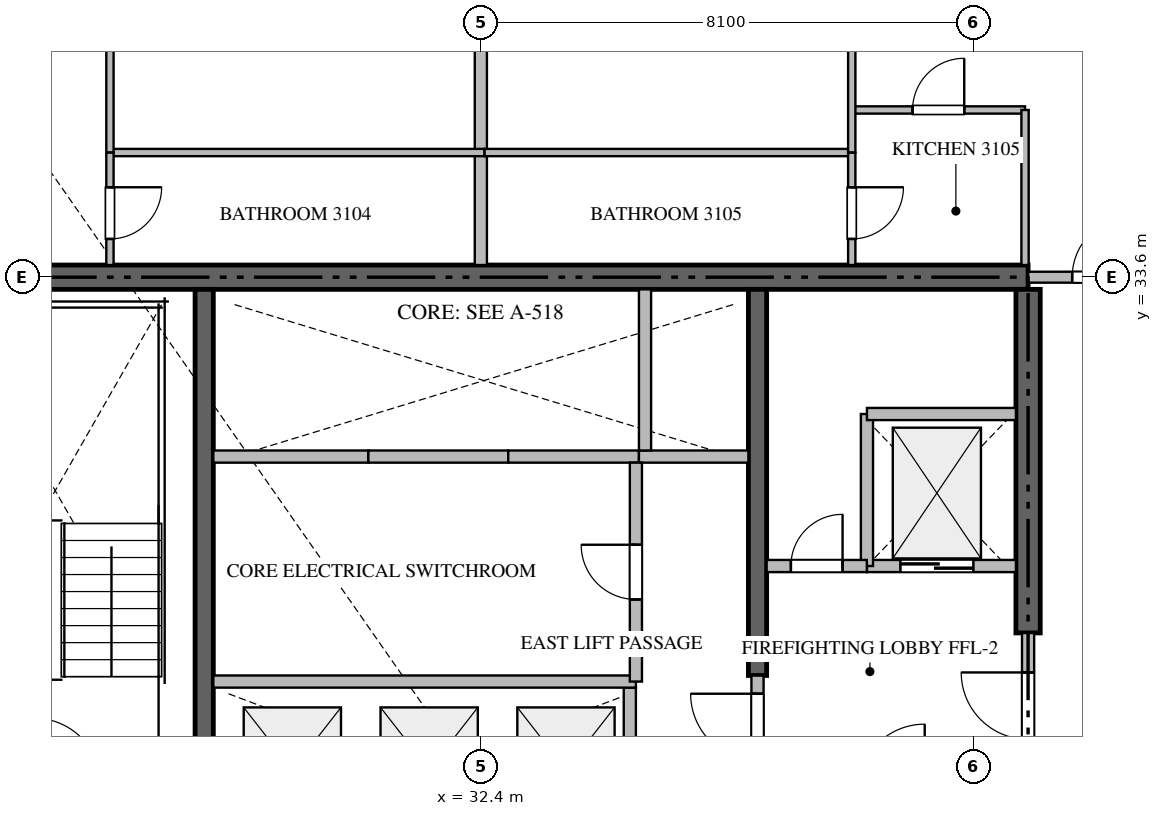
"""IFC4 building model, lengths in metres.
Left out: names, types, materials, properties, quantities, classifications, styles, units other than length and angle.
Written with IfcOpenShell. Run it as: python <this file> out.ifc"""

import sys

from ifc_helpers import new_model, si_unit, direction, frame, frame_2d, origin, place, context, subcontext, project, spatial, rectangle, extrude, source, transform, mapped, element, fill, save


model = new_model("IFC4")
c1 = context("Model", 3, precision=1e-05, world=origin(), true_north=direction((0.0, 1.0)))
c2 = subcontext(c1, "Body", "Model", "MODEL_VIEW")
j1 = project(units=[si_unit("LENGTHUNIT", "METRE"), si_unit("PLANEANGLEUNIT", "RADIAN")], contexts=[c1])
p1 = place(None, origin())
s1 = spatial("IfcSite", under=j1, at=p1, CompositionType="ELEMENT")
p2 = place(p1, origin())
s2 = spatial("IfcBuilding", under=s1, at=p2, CompositionType="ELEMENT")
p3 = place(p2, frame((0.0, 0.0, 127.65)))
s3 = spatial("IfcBuildingStorey", under=s2, at=p3, CompositionType="ELEMENT", Elevation=127.65)
p4 = place(p3, frame((41.4, 33.6, -0.26), z_axis=(0.0, 0.0, 1.0), x_axis=(-1.0, 0.0, 0.0)))
e1 = element("IfcWall", 1, at=p4, inside=s3, PredefinedType="SHEAR", context=c2, shape_type="SweptSolid", body=[
    extrude(rectangle(XDim=18.0, YDim=0.4, at=frame_2d((9.0, 0.0))), origin(), (0.0, 0.0, 1.0), 3.748),
])
p5 = place(p3, frame((41.4, 27.75, -0.26), z_axis=(0.0, 0.0, 1.0), x_axis=(0.0, 1.0, 0.0)))
e2 = element("IfcWall", 2, at=p5, inside=s3, PredefinedType="SHEAR", context=c2, shape_type="SweptSolid", body=[
    extrude(rectangle(XDim=5.65, YDim=0.4, at=frame_2d((2.825, 0.0))), origin(), (0.0, 0.0, 1.0), 3.748),
])
p6 = place(p3, frame((27.85, 23.55, -0.26), z_axis=(0.0, 0.0, 1.0), x_axis=(0.0, 1.0, 0.0)))
e3 = element("IfcWall", 3, at=p6, inside=s3, PredefinedType="SHEAR", context=c2, shape_type="SweptSolid", body=[
    extrude(rectangle(XDim=9.85, YDim=0.3, at=frame_2d((4.925, 0.0))), origin(), (0.0, 0.0, 1.0), 3.748),
])
p7 = place(p3, frame((36.95, 27.05, -0.26), z_axis=(0.0, 0.0, 1.0), x_axis=(0.0, 1.0, 0.0)))
e4 = element("IfcWall", 4, at=p7, inside=s3, PredefinedType="SHEAR", context=c2, shape_type="SweptSolid", body=[
    extrude(rectangle(XDim=6.35, YDim=0.3, at=frame_2d((3.175, 0.0))), origin(), (0.0, 0.0, 1.0), 3.748),
])
p8 = place(p3, frame((38.75, 28.85, 0.0), z_axis=(0.0, 0.0, 1.0), x_axis=(1.0, 0.0, 0.0)))
e5 = element("IfcWall", 5, at=p8, inside=s3, PredefinedType="STANDARD", context=c2, shape_type="SweptSolid", body=[
    extrude(rectangle(XDim=2.45, YDim=0.2, at=frame_2d((1.225, 0.0))), origin(), (0.0, 0.0, 1.0), 3.49),
])
p9 = place(p8, frame((0.55, 0.0, 0.0)))
e6 = element("IfcOpeningElement", 6, at=p9, cuts=e5, PredefinedType="OPENING", context=c2, shape_type="SweptSolid", body=[
    extrude(rectangle(XDim=1.2, YDim=2.2, at=frame_2d((0.6, 1.1))), frame((0.0, 0.11, 0.0), z_axis=(0.0, -1.0, 0.0), x_axis=(1.0, 0.0, 0.0)), (0.0, 0.0, 1.0), 0.22),
])
p10 = place(p3, frame((34.85, 24.35, 0.0), z_axis=(0.0, 0.0, 1.0), x_axis=(0.0, 1.0, 0.0)))
e7 = element("IfcWall", 7, at=p10, inside=s3, PredefinedType="STANDARD", context=c2, shape_type="SweptSolid", body=[
    extrude(rectangle(XDim=2.5, YDim=0.2, at=frame_2d((1.25, 0.0))), origin(), (0.0, 0.0, 1.0), 3.49),
])
p11 = place(p3, frame((28.0, 30.65, 0.0), z_axis=(0.0, 0.0, 1.0), x_axis=(1.0, 0.0, 0.0)))
e8 = element("IfcWall", 8, at=p11, inside=s3, PredefinedType="STANDARD", context=c2, shape_type="SweptSolid", body=[
    extrude(rectangle(XDim=2.55, YDim=0.2, at=frame_2d((1.275, 0.0))), origin(), (0.0, 0.0, 1.0), 3.49),
])
p12 = place(p3, frame((30.55, 30.65, 0.0), z_axis=(0.0, 0.0, 1.0), x_axis=(1.0, 0.0, 0.0)))
e9 = element("IfcWall", 9, at=p12, inside=s3, PredefinedType="STANDARD", context=c2, shape_type="SweptSolid", body=[
    extrude(rectangle(XDim=2.3, YDim=0.2, at=frame_2d((1.15, 0.0))), origin(), (0.0, 0.0, 1.0), 3.49),
])
p13 = place(p3, frame((32.85, 30.65, 0.0), z_axis=(0.0, 0.0, 1.0), x_axis=(1.0, 0.0, 0.0)))
e10 = element("IfcWall", 10, at=p13, inside=s3, PredefinedType="STANDARD", context=c2, shape_type="SweptSolid", body=[
    extrude(rectangle(XDim=2.15, YDim=0.2, at=frame_2d((1.075, 0.0))), origin(), (0.0, 0.0, 1.0), 3.49),
])
p14 = place(p3, frame((35.0, 30.65, 0.0), z_axis=(0.0, 0.0, 1.0), x_axis=(1.0, 0.0, 0.0)))
e11 = element("IfcWall", 11, at=p14, inside=s3, PredefinedType="STANDARD", context=c2, shape_type="SweptSolid", body=[
    extrude(rectangle(XDim=1.8, YDim=0.2, at=frame_2d((0.9, 0.0))), origin(), (0.0, 0.0, 1.0), 3.49),
])
p15 = place(p3, frame((35.1, 30.75, 0.0), z_axis=(0.0, 0.0, 1.0), x_axis=(0.0, 1.0, 0.0)))
e12 = element("IfcWall", 12, at=p15, inside=s3, PredefinedType="STANDARD", context=c2, shape_type="SweptSolid", body=[
    extrude(rectangle(XDim=2.65, YDim=0.2, at=frame_2d((1.325, 0.0))), origin(), (0.0, 0.0, 1.0), 3.49),
])
p16 = place(p3, frame((38.75, 28.85, 0.0), z_axis=(0.0, 0.0, 1.0), x_axis=(0.0, 1.0, 0.0)))
e13 = element("IfcWall", 13, at=p16, inside=s3, PredefinedType="STANDARD", context=c2, shape_type="SweptSolid", body=[
    extrude(rectangle(XDim=2.5, YDim=0.2, at=frame_2d((1.25, 0.0))), origin(), (0.0, 0.0, 1.0), 3.49),
])
p17 = place(p3, frame((38.75, 31.35, 0.0), z_axis=(0.0, 0.0, 1.0), x_axis=(1.0, 0.0, 0.0)))
e14 = element("IfcWall", 14, at=p17, inside=s3, PredefinedType="STANDARD", context=c2, shape_type="SweptSolid", body=[
    extrude(rectangle(XDim=2.45, YDim=0.2, at=frame_2d((1.225, 0.0))), origin(), (0.0, 0.0, 1.0), 3.49),
])
p18 = place(p3, frame((37.1, 28.85, 0.0), z_axis=(0.0, 0.0, 1.0), x_axis=(1.0, 0.0, 0.0)))
e15 = element("IfcWall", 15, at=p18, inside=s3, PredefinedType="STANDARD", context=c2, shape_type="SweptSolid", body=[
    extrude(rectangle(XDim=1.648, YDim=0.2, at=frame_2d((0.824, 0.0))), origin(), (0.0, 0.0, 1.0), 3.49),
])
p19 = place(p18, frame((0.399, 0.0, 0.0)))
e16 = element("IfcOpeningElement", 16, at=p19, cuts=e15, PredefinedType="OPENING", context=c2, shape_type="SweptSolid", body=[
    extrude(rectangle(XDim=0.85, YDim=2.1, at=frame_2d((0.425, 1.05))), frame((0.0, 0.11, 0.0), z_axis=(0.0, -1.0, 0.0), x_axis=(1.0, 0.0, 0.0)), (0.0, 0.0, 1.0), 0.22),
])
p20 = place(p3, frame((41.4, 25.352, 0.0), z_axis=(0.0, 0.0, 1.0), x_axis=(0.0, 1.0, 0.0)))
e17 = element("IfcWall", 17, at=p20, inside=s3, PredefinedType="STANDARD", context=c2, shape_type="SweptSolid", body=[
    extrude(rectangle(XDim=2.396, YDim=0.2, at=frame_2d((1.198, 0.0))), origin(), (0.0, 0.0, 1.0), 3.49),
])
p21 = place(p20, frame((0.648, 0.0, 0.0)))
e18 = element("IfcOpeningElement", 18, at=p21, cuts=e17, PredefinedType="OPENING", context=c2, shape_type="SweptSolid", body=[
    extrude(rectangle(XDim=1.1, YDim=2.15, at=frame_2d((0.55, 1.075))), frame((0.0, 0.11, 0.0), z_axis=(0.0, -1.0, 0.0), x_axis=(1.0, 0.0, 0.0)), (0.0, 0.0, 1.0), 0.22),
])
p22 = place(p3, frame((36.95, 25.352, 0.0), z_axis=(0.0, 0.0, 1.0), x_axis=(0.0, 1.0, 0.0)))
e19 = element("IfcWall", 19, at=p22, inside=s3, PredefinedType="STANDARD", context=c2, shape_type="SweptSolid", body=[
    extrude(rectangle(XDim=1.696, YDim=0.2, at=frame_2d((0.848, 0.0))), origin(), (0.0, 0.0, 1.0), 3.49),
])
p23 = place(p22, frame((0.298, 0.0, 0.0)))
e20 = element("IfcOpeningElement", 20, at=p23, cuts=e19, PredefinedType="OPENING", context=c2, shape_type="SweptSolid", body=[
    extrude(rectangle(XDim=1.1, YDim=2.15, at=frame_2d((0.55, 1.075))), frame((0.0, 0.11, 0.0), z_axis=(0.0, -1.0, 0.0), x_axis=(1.0, 0.0, 0.0)), (0.0, 0.0, 1.0), 0.22),
])
p24 = place(p3, frame((28.0, 26.95, 0.0), z_axis=(0.0, 0.0, 1.0), x_axis=(1.0, 0.0, 0.0)))
e21 = element("IfcWall", 21, at=p24, inside=s3, PredefinedType="STANDARD", context=c2, shape_type="SweptSolid", body=[
    extrude(rectangle(XDim=6.95, YDim=0.2, at=frame_2d((3.475, 0.0))), origin(), (0.0, 0.0, 1.0), 3.49),
])
p25 = place(p3, frame((34.95, 26.95, 0.0), z_axis=(0.0, 0.0, 1.0), x_axis=(0.0, 1.0, 0.0)))
e22 = element("IfcWall", 22, at=p25, inside=s3, PredefinedType="STANDARD", context=c2, shape_type="SweptSolid", body=[
    extrude(rectangle(XDim=3.6, YDim=0.2, at=frame_2d((1.8, 0.0))), origin(), (0.0, 0.0, 1.0), 3.49),
])
p26 = place(p25, frame((1.35, 0.0, 0.0)))
e23 = element("IfcOpeningElement", 23, at=p26, cuts=e22, PredefinedType="OPENING", context=c2, shape_type="SweptSolid", body=[
    extrude(rectangle(XDim=0.9, YDim=2.1, at=frame_2d((0.45, 1.05))), frame((0.0, 0.11, 0.0), z_axis=(0.0, -1.0, 0.0), x_axis=(1.0, 0.0, 0.0)), (0.0, 0.0, 1.0), 0.22),
])
p27 = place(p3, frame((32.4, 33.8, 0.0), z_axis=(0.0, 0.0, 1.0), x_axis=(0.0, 1.0, 0.0)))
e24 = element("IfcWall", 24, at=p27, inside=s3, PredefinedType="PARTITIONING", context=c2, shape_type="SweptSolid", body=[
    extrude(rectangle(XDim=15.118, YDim=0.2, at=frame_2d((7.559, 0.0))), origin(), (0.0, 0.0, 1.0), 3.49),
])
p28 = place(p3, frame((41.402, 33.6, 0.0), z_axis=(0.0, 0.0, 1.0), x_axis=(1.0, 0.0, 0.0)))
e25 = element("IfcWall", 25, at=p28, inside=s3, PredefinedType="PARTITIONING", context=c2, shape_type="SweptSolid", body=[
    extrude(rectangle(XDim=2.446, YDim=0.18, at=frame_2d((1.223, 0.0))), origin(), (0.0, 0.0, 1.0), 3.49),
])
p29 = place(p28, frame((0.723, 0.0, 0.0)))
e26 = element("IfcOpeningElement", 26, at=p29, cuts=e25, PredefinedType="OPENING", context=c2, shape_type="SweptSolid", body=[
    extrude(rectangle(XDim=1.0, YDim=2.15, at=frame_2d((0.5, 1.075))), frame((0.0, 0.1, 0.0), z_axis=(0.0, -1.0, 0.0), x_axis=(1.0, 0.0, 0.0)), (0.0, 0.0, 1.0), 0.2),
])
p30 = place(p3, frame((26.3, 35.65, 0.0), z_axis=(0.0, 0.0, 1.0), x_axis=(1.0, 0.0, 0.0)))
e27 = element("IfcWall", 27, at=p30, inside=s3, PredefinedType="PARTITIONING", context=c2, shape_type="SweptSolid", body=[
    extrude(rectangle(XDim=6.16, YDim=0.12, at=frame_2d((3.08, 0.0))), origin(), (0.0, 0.0, 1.0), 3.49),
])
p31 = place(p3, frame((26.3, 43.927, 0.0), z_axis=(0.0, 0.0, 1.0), x_axis=(0.0, -1.0, 0.0)))
e28 = element("IfcWall", 28, at=p31, inside=s3, PredefinedType="PARTITIONING", context=c2, shape_type="SweptSolid", body=[
    extrude(rectangle(XDim=8.277, YDim=0.12, at=frame_2d((4.139, 0.0))), origin(), (0.0, 0.0, 1.0), 3.49),
])
p32 = place(p31, frame((3.714, 0.0, 0.0)))
e29 = element("IfcOpeningElement", 29, at=p32, cuts=e28, PredefinedType="OPENING", context=c2, shape_type="SweptSolid", body=[
    extrude(rectangle(XDim=0.85, YDim=2.1, at=frame_2d((0.425, 1.05))), frame((0.0, 0.07, 0.0), z_axis=(0.0, -1.0, 0.0), x_axis=(1.0, 0.0, 0.0)), (0.0, 0.0, 1.0), 0.14),
])
p33 = place(p3, frame((26.3, 35.648, 0.0), z_axis=(0.0, 0.0, 1.0), x_axis=(0.0, -1.0, 0.0)))
e30 = element("IfcWall", 30, at=p33, inside=s3, PredefinedType="PARTITIONING", context=c2, shape_type="SweptSolid", body=[
    extrude(rectangle(XDim=1.848, YDim=0.12, at=frame_2d((0.924, 0.0))), origin(), (0.0, 0.0, 1.0), 3.49),
])
p34 = place(p33, frame((0.569, 0.0, 0.0)))
e31 = element("IfcOpeningElement", 31, at=p34, cuts=e30, PredefinedType="OPENING", context=c2, shape_type="SweptSolid", body=[
    extrude(rectangle(XDim=0.85, YDim=2.1, at=frame_2d((0.425, 1.05))), frame((0.0, 0.07, 0.0), z_axis=(0.0, -1.0, 0.0), x_axis=(1.0, 0.0, 0.0)), (0.0, 0.0, 1.0), 0.14),
])
p35 = place(p3, frame((38.5, 36.35, 0.0), z_axis=(0.0, 0.0, 1.0), x_axis=(1.0, 0.0, 0.0)))
e32 = element("IfcWall", 32, at=p35, inside=s3, PredefinedType="PARTITIONING", context=c2, shape_type="SweptSolid", body=[
    extrude(rectangle(XDim=2.85, YDim=0.12, at=frame_2d((1.425, 0.0))), origin(), (0.0, 0.0, 1.0), 3.49),
])
p36 = place(p35, frame((1.0, 0.0, 0.0)))
e33 = element("IfcOpeningElement", 33, at=p36, cuts=e32, PredefinedType="OPENING", context=c2, shape_type="SweptSolid", body=[
    extrude(rectangle(XDim=0.85, YDim=2.1, at=frame_2d((0.425, 1.05))), frame((0.0, 0.07, 0.0), z_axis=(0.0, -1.0, 0.0), x_axis=(1.0, 0.0, 0.0)), (0.0, 0.0, 1.0), 0.14),
])
p37 = place(p3, frame((41.35, 36.35, 0.0), z_axis=(0.0, 0.0, 1.0), x_axis=(0.0, -1.0, 0.0)))
e34 = element("IfcWall", 34, at=p37, inside=s3, PredefinedType="PARTITIONING", context=c2, shape_type="SweptSolid", body=[
    extrude(rectangle(XDim=2.55, YDim=0.12, at=frame_2d((1.275, 0.0))), origin(), (0.0, 0.0, 1.0), 3.49),
])
p38 = place(p3, frame((32.462, 35.65, 0.0), z_axis=(0.0, 0.0, 1.0), x_axis=(1.0, 0.0, 0.0)))
e35 = element("IfcWall", 35, at=p38, inside=s3, PredefinedType="PARTITIONING", context=c2, shape_type="SweptSolid", body=[
    extrude(rectangle(XDim=6.038, YDim=0.12, at=frame_2d((3.019, 0.0))), origin(), (0.0, 0.0, 1.0), 3.49),
])
p39 = place(p3, frame((38.5, 41.963, 0.0), z_axis=(0.0, 0.0, 1.0), x_axis=(0.0, -1.0, 0.0)))
e36 = element("IfcWall", 36, at=p39, inside=s3, PredefinedType="PARTITIONING", context=c2, shape_type="SweptSolid", body=[
    extrude(rectangle(XDim=6.313, YDim=0.12, at=frame_2d((3.156, 0.0))), origin(), (0.0, 0.0, 1.0), 3.49),
])
p40 = place(p39, frame((2.732, 0.0, 0.0)))
e37 = element("IfcOpeningElement", 37, at=p40, cuts=e36, PredefinedType="OPENING", context=c2, shape_type="SweptSolid", body=[
    extrude(rectangle(XDim=0.85, YDim=2.1, at=frame_2d((0.425, 1.05))), frame((0.0, 0.07, 0.0), z_axis=(0.0, -1.0, 0.0), x_axis=(1.0, 0.0, 0.0)), (0.0, 0.0, 1.0), 0.14),
])
p41 = place(p3, frame((38.5, 35.648, 0.0), z_axis=(0.0, 0.0, 1.0), x_axis=(0.0, -1.0, 0.0)))
e38 = element("IfcWall", 38, at=p41, inside=s3, PredefinedType="PARTITIONING", context=c2, shape_type="SweptSolid", body=[
    extrude(rectangle(XDim=1.848, YDim=0.12, at=frame_2d((0.924, 0.0))), origin(), (0.0, 0.0, 1.0), 3.49),
])
p42 = place(p41, frame((0.569, 0.0, 0.0)))
e39 = element("IfcOpeningElement", 39, at=p42, cuts=e38, PredefinedType="OPENING", context=c2, shape_type="SweptSolid", body=[
    extrude(rectangle(XDim=0.85, YDim=2.1, at=frame_2d((0.425, 1.05))), frame((0.0, 0.07, 0.0), z_axis=(0.0, -1.0, 0.0), x_axis=(1.0, 0.0, 0.0)), (0.0, 0.0, 1.0), 0.14),
])
m1 = source(origin(), c2, "Body", "SweptSolid", [
    extrude(rectangle(XDim=1.2, YDim=2.2, at=frame_2d((0.6, 1.1))), frame((0.0, 0.025, 0.0), z_axis=(0.0, -1.0, 0.0), x_axis=(1.0, 0.0, 0.0)), (0.0, 0.0, 1.0), 0.05),
])
p43 = place(p9, origin())
e40 = element("IfcDoor", 40, at=p43, inside=s3, OperationType="DOUBLE_DOOR_SLIDING", PredefinedType="DOOR", context=c2, shape_type="MappedRepresentation", body=[
    mapped(m1, transform((0.0, 0.0, 0.0), scale=1.0)),
])
fill(e6, e40)
m2 = source(origin(), c2, "Body", "SweptSolid", [
    extrude(rectangle(XDim=0.85, YDim=2.1, at=frame_2d((0.425, 1.05))), frame((0.0, 0.025, 0.0), z_axis=(0.0, -1.0, 0.0), x_axis=(1.0, 0.0, 0.0)), (0.0, 0.0, 1.0), 0.05),
])
p44 = place(p19, origin())
e41 = element("IfcDoor", 41, at=p44, inside=s3, OperationType="SINGLE_SWING_RIGHT", PredefinedType="DOOR", context=c2, shape_type="MappedRepresentation", body=[
    mapped(m2, transform((0.0, 0.0, 0.0), scale=1.0)),
])
fill(e16, e41)
m3 = source(origin(), c2, "Body", "SweptSolid", [
    extrude(rectangle(XDim=1.1, YDim=2.15, at=frame_2d((0.55, 1.075))), frame((0.0, 0.025, 0.0), z_axis=(0.0, -1.0, 0.0), x_axis=(1.0, 0.0, 0.0)), (0.0, 0.0, 1.0), 0.05),
])
p45 = place(p21, origin())
e42 = element("IfcDoor", 42, at=p45, inside=s3, OperationType="SINGLE_SWING_RIGHT", PredefinedType="DOOR", context=c2, shape_type="MappedRepresentation", body=[
    mapped(m3, transform((0.0, 0.0, 0.0), scale=1.0)),
])
fill(e18, e42)
p46 = place(p23, origin())
e43 = element("IfcDoor", 43, at=p46, inside=s3, OperationType="SINGLE_SWING_RIGHT", PredefinedType="DOOR", context=c2, shape_type="MappedRepresentation", body=[
    mapped(m3, transform((0.0, 0.0, 0.0), scale=1.0)),
])
fill(e20, e43)
m4 = source(origin(), c2, "Body", "SweptSolid", [
    extrude(rectangle(XDim=0.9, YDim=2.1, at=frame_2d((0.45, 1.05))), frame((0.0, 0.025, 0.0), z_axis=(0.0, -1.0, 0.0), x_axis=(1.0, 0.0, 0.0)), (0.0, 0.0, 1.0), 0.05),
])
p47 = place(p26, origin())
e44 = element("IfcDoor", 44, at=p47, inside=s3, OperationType="SINGLE_SWING_RIGHT", PredefinedType="DOOR", context=c2, shape_type="MappedRepresentation", body=[
    mapped(m4, transform((0.0, 0.0, 0.0), scale=1.0)),
])
fill(e23, e44)
m5 = source(origin(), c2, "Body", "SweptSolid", [
    extrude(rectangle(XDim=1.0, YDim=2.15, at=frame_2d((0.5, 1.075))), frame((0.0, 0.025, 0.0), z_axis=(0.0, -1.0, 0.0), x_axis=(1.0, 0.0, 0.0)), (0.0, 0.0, 1.0), 0.05),
])
p48 = place(p29, origin())
e45 = element("IfcDoor", 45, at=p48, inside=s3, OperationType="SINGLE_SWING_RIGHT", PredefinedType="DOOR", context=c2, shape_type="MappedRepresentation", body=[
    mapped(m5, transform((0.0, 0.0, 0.0), scale=1.0)),
])
fill(e26, e45)
p49 = place(p34, origin())
e46 = element("IfcDoor", 46, at=p49, inside=s3, OperationType="SINGLE_SWING_LEFT", PredefinedType="DOOR", context=c2, shape_type="MappedRepresentation", body=[
    mapped(m2, transform((0.0, 0.0, 0.0), scale=1.0)),
])
fill(e31, e46)
p50 = place(p36, origin())
e47 = element("IfcDoor", 47, at=p50, inside=s3, OperationType="SINGLE_SWING_RIGHT", PredefinedType="DOOR", context=c2, shape_type="MappedRepresentation", body=[
    mapped(m2, transform((0.0, 0.0, 0.0), scale=1.0)),
])
fill(e33, e47)
p51 = place(p42, origin())
e48 = element("IfcDoor", 48, at=p51, inside=s3, OperationType="SINGLE_SWING_LEFT", PredefinedType="DOOR", context=c2, shape_type="MappedRepresentation", body=[
    mapped(m2, transform((0.0, 0.0, 0.0), scale=1.0)),
])
fill(e39, e48)
save(model, sys.argv[1])
